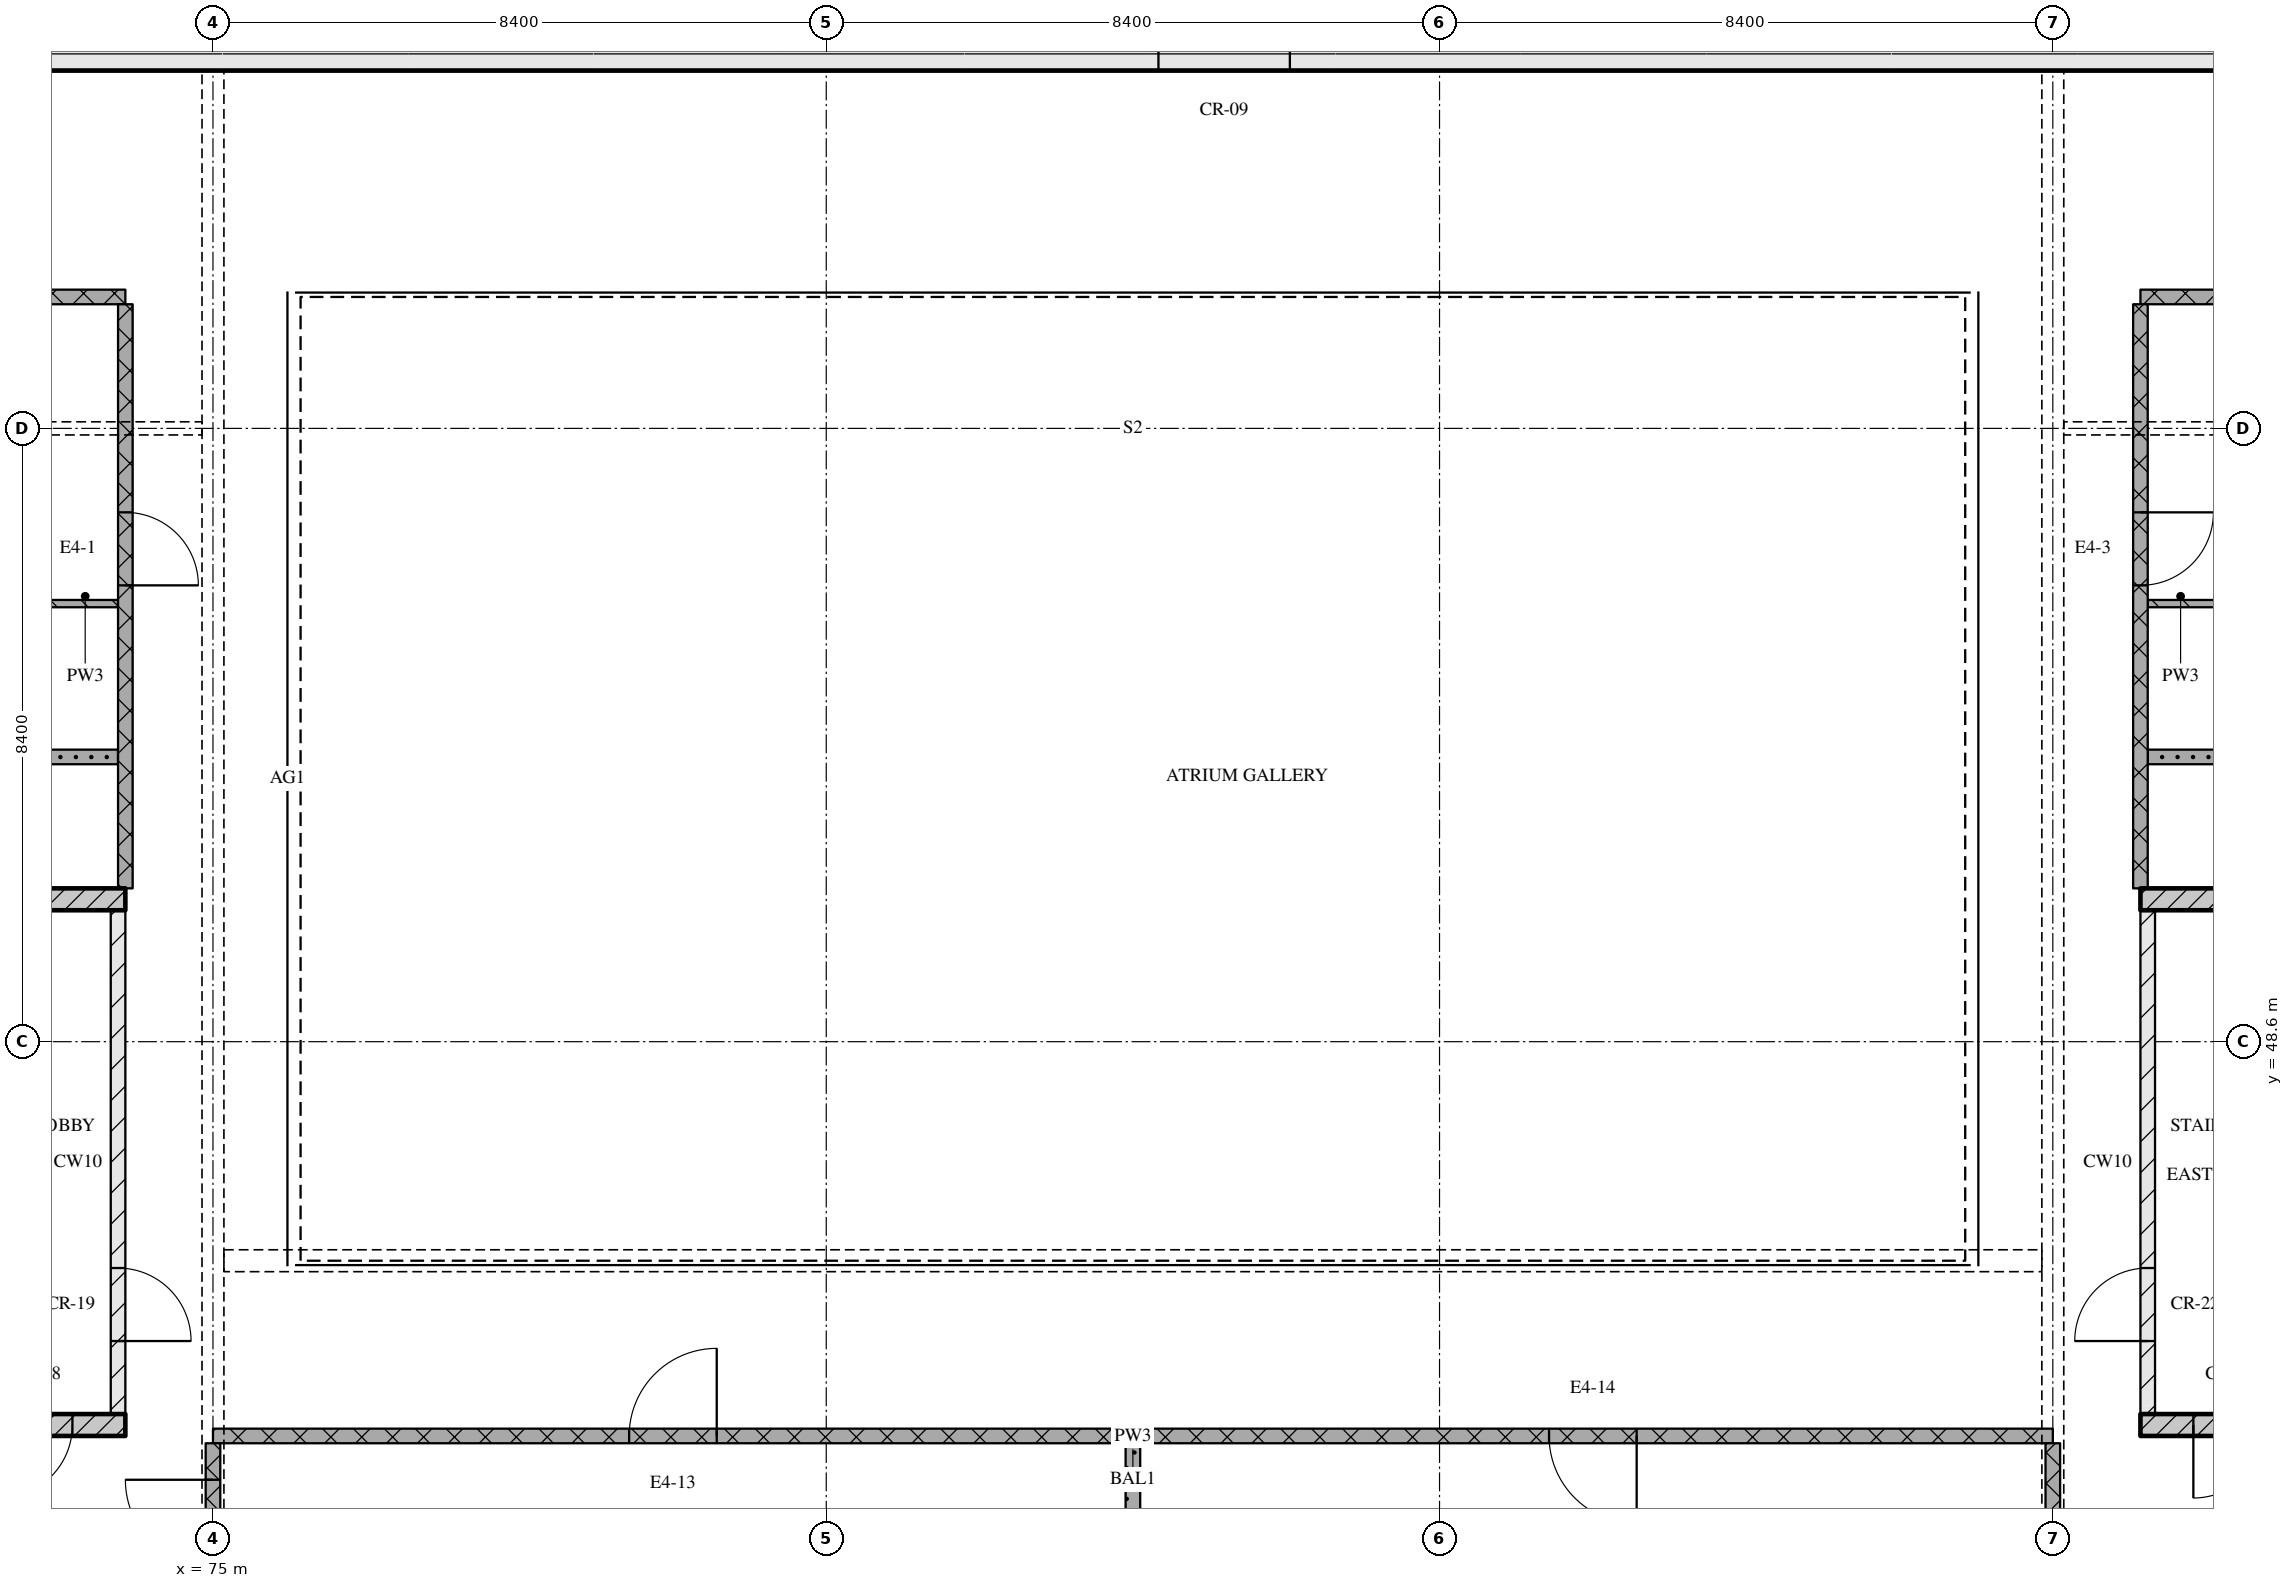
"""IFC4 building model, lengths in metres.
Left out: names, types, materials, properties, quantities, classifications, styles, units other than length and angle.
Written with IfcOpenShell. Run it as: python <this file> out.ifc"""

import sys

from ifc_helpers import new_model, si_unit, direction, frame, frame_2d, origin, place, context, subcontext, project, spatial, rectangle, extrude, element, fill, save


model = new_model("IFC4")
c1 = context("Model", 3, precision=1e-05, world=origin(), true_north=direction((0.0, 1.0)))
c2 = subcontext(c1, "Body", "Model", "MODEL_VIEW")
j1 = project(units=[si_unit("LENGTHUNIT", "METRE"), si_unit("PLANEANGLEUNIT", "RADIAN")], contexts=[c1])
p1 = place(None, origin())
s1 = spatial("IfcSite", under=j1, at=p1, CompositionType="ELEMENT")
p2 = place(p1, origin())
s2 = spatial("IfcBuilding", under=s1, at=p2, CompositionType="ELEMENT")
p3 = place(p2, frame((0.0, 0.0, 285.15)))
s3 = spatial("IfcBuildingStorey", under=s2, at=p3, CompositionType="ELEMENT", Elevation=285.15)
p4 = place(p3, frame((67.3, 62.15, 0.0), z_axis=(0.0, 0.0, 1.0), x_axis=(1.0, 0.0, 0.0)))
e1 = element("IfcWall", 1, at=p4, inside=s3, PredefinedType="SOLIDWALL", context=c2, shape_type="SweptSolid", body=[
    extrude(rectangle(XDim=40.6, YDim=0.5, at=frame_2d((20.3, 0.0))), origin(), (0.0, 0.0, 1.0), 3.32),
])
p5 = place(p4, frame((20.65, 0.0, 0.0)))
e2 = element("IfcOpeningElement", 2, at=p5, cuts=e1, PredefinedType="OPENING", context=c2, shape_type="SweptSolid", body=[
    extrude(rectangle(XDim=1.8, YDim=2.1, at=frame_2d((0.9, 1.05))), frame((0.0, 0.26, 0.0), z_axis=(0.0, -1.0, 0.0), x_axis=(1.0, 0.0, 0.0)), (0.0, 0.0, 1.0), 0.52),
])
p6 = place(p3, frame((68.2, 43.35, 0.0), z_axis=(0.0, 0.0, 1.0), x_axis=(1.0, 0.0, 0.0)))
e3 = element("IfcWall", 3, at=p6, inside=s3, PredefinedType="SOLIDWALL", context=c2, shape_type="SweptSolid", body=[
    extrude(rectangle(XDim=5.6, YDim=0.3, at=frame_2d((2.8, 0.0))), origin(), (0.0, 0.0, 1.0), 3.32),
])
p7 = place(p6, frame((3.875, 0.0, 0.0)))
e4 = element("IfcOpeningElement", 4, at=p7, cuts=e3, PredefinedType="OPENING", context=c2, shape_type="SweptSolid", body=[
    extrude(rectangle(XDim=1.0, YDim=2.1, at=frame_2d((0.5, 1.05))), frame((0.0, 0.16, 0.0), z_axis=(0.0, -1.0, 0.0), x_axis=(1.0, 0.0, 0.0)), (0.0, 0.0, 1.0), 0.32),
])
p8 = place(p3, frame((73.7, 43.5, 0.0), z_axis=(0.0, 0.0, 1.0), x_axis=(0.0, 1.0, 0.0)))
e5 = element("IfcWall", 5, at=p8, inside=s3, PredefinedType="PARTITIONING", context=c2, shape_type="SweptSolid", body=[
    extrude(rectangle(XDim=6.9, YDim=0.2, at=frame_2d((3.45, 0.0))), origin(), (0.0, 0.0, 1.0), 3.32),
])
p9 = place(p8, frame((1.0, 0.0, 0.0)))
e6 = element("IfcOpeningElement", 6, at=p9, cuts=e5, PredefinedType="OPENING", context=c2, shape_type="SweptSolid", body=[
    extrude(rectangle(XDim=1.0, YDim=2.1, at=frame_2d((0.5, 1.05))), frame((0.0, 0.11, 0.0), z_axis=(0.0, -1.0, 0.0), x_axis=(1.0, 0.0, 0.0)), (0.0, 0.0, 1.0), 0.22),
])
p10 = place(p3, frame((68.2, 50.55, 0.0), z_axis=(0.0, 0.0, 1.0), x_axis=(1.0, 0.0, 0.0)))
e7 = element("IfcWall", 7, at=p10, inside=s3, PredefinedType="SOLIDWALL", context=c2, shape_type="SweptSolid", body=[
    extrude(rectangle(XDim=5.6, YDim=0.3, at=frame_2d((2.8, 0.0))), origin(), (0.0, 0.0, 1.0), 3.32),
])
p11 = place(p3, frame((101.4, 43.35, 0.0), z_axis=(0.0, 0.0, 1.0), x_axis=(1.0, 0.0, 0.0)))
e8 = element("IfcWall", 8, at=p11, inside=s3, PredefinedType="SOLIDWALL", context=c2, shape_type="SweptSolid", body=[
    extrude(rectangle(XDim=5.6, YDim=0.3, at=frame_2d((2.8, 0.0))), origin(), (0.0, 0.0, 1.0), 3.32),
])
p12 = place(p11, frame((0.725, 0.0, 0.0)))
e9 = element("IfcOpeningElement", 9, at=p12, cuts=e8, PredefinedType="OPENING", context=c2, shape_type="SweptSolid", body=[
    extrude(rectangle(XDim=1.0, YDim=2.1, at=frame_2d((0.5, 1.05))), frame((0.0, 0.16, 0.0), z_axis=(0.0, -1.0, 0.0), x_axis=(1.0, 0.0, 0.0)), (0.0, 0.0, 1.0), 0.32),
])
p13 = place(p3, frame((101.5, 43.5, 0.0), z_axis=(0.0, 0.0, 1.0), x_axis=(0.0, 1.0, 0.0)))
e10 = element("IfcWall", 10, at=p13, inside=s3, PredefinedType="PARTITIONING", context=c2, shape_type="SweptSolid", body=[
    extrude(rectangle(XDim=6.9, YDim=0.2, at=frame_2d((3.45, 0.0))), origin(), (0.0, 0.0, 1.0), 3.32),
])
p14 = place(p13, frame((1.0, 0.0, 0.0)))
e11 = element("IfcOpeningElement", 11, at=p14, cuts=e10, PredefinedType="OPENING", context=c2, shape_type="SweptSolid", body=[
    extrude(rectangle(XDim=1.0, YDim=2.1, at=frame_2d((0.5, 1.05))), frame((0.0, 0.11, 0.0), z_axis=(0.0, -1.0, 0.0), x_axis=(1.0, 0.0, 0.0)), (0.0, 0.0, 1.0), 0.22),
])
p15 = place(p3, frame((101.4, 50.55, 0.0), z_axis=(0.0, 0.0, 1.0), x_axis=(1.0, 0.0, 0.0)))
e12 = element("IfcWall", 12, at=p15, inside=s3, PredefinedType="SOLIDWALL", context=c2, shape_type="SweptSolid", body=[
    extrude(rectangle(XDim=5.6, YDim=0.3, at=frame_2d((2.8, 0.0))), origin(), (0.0, 0.0, 1.0), 3.32),
])
p16 = place(p3, frame((100.2, 43.2, 0.0), z_axis=(0.0, 0.0, 1.0), x_axis=(-1.0, 0.0, 0.0)))
e13 = element("IfcWall", 13, at=p16, inside=s3, PredefinedType="PARTITIONING", context=c2, shape_type="SweptSolid", body=[
    extrude(rectangle(XDim=25.2, YDim=0.2, at=frame_2d((12.6, 0.0))), origin(), (0.0, 0.0, 1.0), 3.32),
])
p17 = place(p16, frame((5.7, 0.0, 0.0)))
e14 = element("IfcOpeningElement", 14, at=p17, cuts=e13, PredefinedType="OPENING", context=c2, shape_type="SweptSolid", body=[
    extrude(rectangle(XDim=1.2, YDim=2.1, at=frame_2d((0.6, 1.05))), frame((0.0, 0.11, 0.0), z_axis=(0.0, -1.0, 0.0), x_axis=(1.0, 0.0, 0.0)), (0.0, 0.0, 1.0), 0.22),
])
p18 = place(p16, frame((18.3, 0.0, 0.0)))
e15 = element("IfcOpeningElement", 15, at=p18, cuts=e13, PredefinedType="OPENING", context=c2, shape_type="SweptSolid", body=[
    extrude(rectangle(XDim=1.2, YDim=2.1, at=frame_2d((0.6, 1.05))), frame((0.0, 0.11, 0.0), z_axis=(0.0, -1.0, 0.0), x_axis=(1.0, 0.0, 0.0)), (0.0, 0.0, 1.0), 0.22),
])
for number, where, z_axis, x_axis in (
    (16, (56.68, 52.5, 0.0), (0.0, 0.0, 1.0), (1.0, 0.0, 0.0)),
    (17, (101.5, 52.5, 0.0), (0.0, 0.0, 1.0), (1.0, 0.0, 0.0)),
):
    element("IfcWall", number, at=place(p3, frame(where, z_axis=z_axis, x_axis=x_axis)), inside=s3, PredefinedType="PARTITIONING", context=c2, shape_type="SweptSolid", body=[
        extrude(rectangle(XDim=17.02, YDim=0.2, at=frame_2d((8.51, 0.0))), origin(), (0.0, 0.0, 1.0), 3.32),
    ])
p19 = place(p3, frame((73.7, 54.6, 0.0), z_axis=(0.0, 0.0, 1.0), x_axis=(-1.0, 0.0, 0.0)))
e18 = element("IfcWall", 18, at=p19, inside=s3, PredefinedType="PARTITIONING", context=c2, shape_type="SweptSolid", body=[
    extrude(rectangle(XDim=9.8, YDim=0.1, at=frame_2d((4.9, 0.0))), origin(), (0.0, 0.0, 1.0), 3.32),
])
p20 = place(p19, frame((4.45, 0.0, 0.0)))
e19 = element("IfcOpeningElement", 19, at=p20, cuts=e18, PredefinedType="OPENING", context=c2, shape_type="SweptSolid", body=[
    extrude(rectangle(XDim=0.8, YDim=2.1, at=frame_2d((0.4, 1.05))), frame((0.0, 0.06, 0.0), z_axis=(0.0, -1.0, 0.0), x_axis=(1.0, 0.0, 0.0)), (0.0, 0.0, 1.0), 0.12),
])
p21 = place(p3, frame((101.5, 54.6, 0.0), z_axis=(0.0, 0.0, 1.0), x_axis=(1.0, 0.0, 0.0)))
e20 = element("IfcWall", 20, at=p21, inside=s3, PredefinedType="PARTITIONING", context=c2, shape_type="SweptSolid", body=[
    extrude(rectangle(XDim=7.1, YDim=0.1, at=frame_2d((3.55, 0.0))), origin(), (0.0, 0.0, 1.0), 3.32),
])
for number, where, z_axis, x_axis in (
    (21, (64.2, 58.8, 0.0), (0.0, 0.0, 1.0), (1.0, 0.0, 0.0)),
    (22, (101.4, 58.8, 0.0), (0.0, 0.0, 1.0), (1.0, 0.0, 0.0)),
):
    element("IfcWall", number, at=place(p3, frame(where, z_axis=z_axis, x_axis=x_axis)), inside=s3, PredefinedType="PARTITIONING", context=c2, shape_type="SweptSolid", body=[
        extrude(rectangle(XDim=9.6, YDim=0.2, at=frame_2d((4.8, 0.0))), origin(), (0.0, 0.0, 1.0), 3.32),
    ])
p22 = place(p3, frame((73.8, 50.7, 0.0), z_axis=(0.0, 0.0, 1.0), x_axis=(0.0, 1.0, 0.0)))
e23 = element("IfcWall", 23, at=p22, inside=s3, PredefinedType="PARTITIONING", context=c2, shape_type="SweptSolid", body=[
    extrude(rectangle(XDim=8.0, YDim=0.2, at=frame_2d((4.0, 0.0))), origin(), (0.0, 0.0, 1.0), 3.32),
])
p23 = place(p22, frame((4.15, 0.0, 0.0)))
e24 = element("IfcOpeningElement", 24, at=p23, cuts=e23, PredefinedType="OPENING", context=c2, shape_type="SweptSolid", body=[
    extrude(rectangle(XDim=1.0, YDim=2.1, at=frame_2d((0.5, 1.05))), frame((0.0, 0.11, 0.0), z_axis=(0.0, -1.0, 0.0), x_axis=(1.0, 0.0, 0.0)), (0.0, 0.0, 1.0), 0.22),
])
p24 = place(p3, frame((75.0, 43.1, 0.0), z_axis=(0.0, 0.0, 1.0), x_axis=(0.0, -1.0, 0.0)))
e25 = element("IfcWall", 25, at=p24, inside=s3, PredefinedType="PARTITIONING", context=c2, shape_type="SweptSolid", body=[
    extrude(rectangle(XDim=2.2, YDim=0.2, at=frame_2d((1.1, 0.0))), origin(), (0.0, 0.0, 1.0), 2.53),
])
p25 = place(p24, frame((0.5, 0.0, 0.0)))
e26 = element("IfcOpeningElement", 26, at=p25, cuts=e25, PredefinedType="OPENING", context=c2, shape_type="SweptSolid", body=[
    extrude(rectangle(XDim=1.2, YDim=2.1, at=frame_2d((0.6, 1.05))), frame((0.0, 0.11, 0.0), z_axis=(0.0, -1.0, 0.0), x_axis=(1.0, 0.0, 0.0)), (0.0, 0.0, 1.0), 0.22),
])
p26 = place(p3, frame((87.6, 43.1, 0.0), z_axis=(0.0, 0.0, 1.0), x_axis=(0.0, -1.0, 0.0)))
e27 = element("IfcWall", 27, at=p26, inside=s3, PredefinedType="PARTITIONING", context=c2, shape_type="SweptSolid", body=[
    extrude(rectangle(XDim=4.42, YDim=0.2, at=frame_2d((2.21, 0.0))), origin(), (0.0, 0.0, 1.0), 3.32),
])
p27 = place(p3, frame((100.2, 43.1, 0.0), z_axis=(0.0, 0.0, 1.0), x_axis=(0.0, -1.0, 0.0)))
e28 = element("IfcWall", 28, at=p27, inside=s3, PredefinedType="PARTITIONING", context=c2, shape_type="SweptSolid", body=[
    extrude(rectangle(XDim=2.2, YDim=0.2, at=frame_2d((1.1, 0.0))), origin(), (0.0, 0.0, 1.0), 2.53),
])
p28 = place(p3, frame((101.4, 58.7, 0.0), z_axis=(0.0, 0.0, 1.0), x_axis=(0.0, -1.0, 0.0)))
e29 = element("IfcWall", 29, at=p28, inside=s3, PredefinedType="PARTITIONING", context=c2, shape_type="SweptSolid", body=[
    extrude(rectangle(XDim=8.0, YDim=0.2, at=frame_2d((4.0, 0.0))), origin(), (0.0, 0.0, 1.0), 3.32),
])
p29 = place(p28, frame((2.85, 0.0, 0.0)))
e30 = element("IfcOpeningElement", 30, at=p29, cuts=e29, PredefinedType="OPENING", context=c2, shape_type="SweptSolid", body=[
    extrude(rectangle(XDim=1.0, YDim=2.1, at=frame_2d((0.5, 1.05))), frame((0.0, 0.11, 0.0), z_axis=(0.0, -1.0, 0.0), x_axis=(1.0, 0.0, 0.0)), (0.0, 0.0, 1.0), 0.22),
])
p30 = place(p5, origin())
e31 = element("IfcDoor", 31, at=p30, inside=s3, OperationType="DOUBLE_DOOR_SINGLE_SWING", PredefinedType="DOOR", context=c2, shape_type="SweptSolid", body=[
    extrude(rectangle(XDim=1.8, YDim=2.1, at=frame_2d((0.9, 1.05))), frame((0.0, 0.025, 0.0), z_axis=(0.0, -1.0, 0.0), x_axis=(1.0, 0.0, 0.0)), (0.0, 0.0, 1.0), 0.05),
])
fill(e2, e31)
p31 = place(p7, origin())
e32 = element("IfcDoor", 32, at=p31, inside=s3, OperationType="SINGLE_SWING_RIGHT", PredefinedType="DOOR", context=c2, shape_type="SweptSolid", body=[
    extrude(rectangle(XDim=1.0, YDim=2.1, at=frame_2d((0.5, 1.05))), frame((0.0, 0.025, 0.0), z_axis=(0.0, -1.0, 0.0), x_axis=(1.0, 0.0, 0.0)), (0.0, 0.0, 1.0), 0.05),
])
fill(e4, e32)
p32 = place(p9, origin())
e33 = element("IfcDoor", 33, at=p32, inside=s3, OperationType="SINGLE_SWING_RIGHT", PredefinedType="DOOR", context=c2, shape_type="SweptSolid", body=[
    extrude(rectangle(XDim=1.0, YDim=2.1, at=frame_2d((0.5, 1.05))), frame((0.0, 0.025, 0.0), z_axis=(0.0, -1.0, 0.0), x_axis=(1.0, 0.0, 0.0)), (0.0, 0.0, 1.0), 0.05),
])
fill(e6, e33)
p33 = place(p12, origin())
e34 = element("IfcDoor", 34, at=p33, inside=s3, OperationType="SINGLE_SWING_RIGHT", PredefinedType="DOOR", context=c2, shape_type="SweptSolid", body=[
    extrude(rectangle(XDim=1.0, YDim=2.1, at=frame_2d((0.5, 1.05))), frame((0.0, 0.025, 0.0), z_axis=(0.0, -1.0, 0.0), x_axis=(1.0, 0.0, 0.0)), (0.0, 0.0, 1.0), 0.05),
])
fill(e9, e34)
p34 = place(p14, origin())
e35 = element("IfcDoor", 35, at=p34, inside=s3, OperationType="SINGLE_SWING_LEFT", PredefinedType="DOOR", context=c2, shape_type="SweptSolid", body=[
    extrude(rectangle(XDim=1.0, YDim=2.1, at=frame_2d((0.5, 1.05))), frame((0.0, 0.025, 0.0), z_axis=(0.0, -1.0, 0.0), x_axis=(1.0, 0.0, 0.0)), (0.0, 0.0, 1.0), 0.05),
])
fill(e11, e35)
p35 = place(p17, origin())
e36 = element("IfcDoor", 36, at=p35, inside=s3, OperationType="SINGLE_SWING_LEFT", PredefinedType="DOOR", context=c2, shape_type="SweptSolid", body=[
    extrude(rectangle(XDim=1.2, YDim=2.1, at=frame_2d((0.6, 1.05))), frame((0.0, 0.025, 0.0), z_axis=(0.0, -1.0, 0.0), x_axis=(1.0, 0.0, 0.0)), (0.0, 0.0, 1.0), 0.05),
])
fill(e14, e36)
p36 = place(p18, origin())
e37 = element("IfcDoor", 37, at=p36, inside=s3, OperationType="SINGLE_SWING_RIGHT", PredefinedType="DOOR", context=c2, shape_type="SweptSolid", body=[
    extrude(rectangle(XDim=1.2, YDim=2.1, at=frame_2d((0.6, 1.05))), frame((0.0, 0.025, 0.0), z_axis=(0.0, -1.0, 0.0), x_axis=(1.0, 0.0, 0.0)), (0.0, 0.0, 1.0), 0.05),
])
fill(e15, e37)
p37 = place(p23, origin())
e38 = element("IfcDoor", 38, at=p37, inside=s3, OperationType="SINGLE_SWING_RIGHT", PredefinedType="DOOR", context=c2, shape_type="SweptSolid", body=[
    extrude(rectangle(XDim=1.0, YDim=2.1, at=frame_2d((0.5, 1.05))), frame((0.0, 0.025, 0.0), z_axis=(0.0, -1.0, 0.0), x_axis=(1.0, 0.0, 0.0)), (0.0, 0.0, 1.0), 0.05),
])
fill(e24, e38)
p38 = place(p25, origin())
e39 = element("IfcDoor", 39, at=p38, inside=s3, OperationType="SINGLE_SWING_RIGHT", PredefinedType="DOOR", context=c2, shape_type="SweptSolid", body=[
    extrude(rectangle(XDim=1.2, YDim=2.1, at=frame_2d((0.6, 1.05))), frame((0.0, 0.025, 0.0), z_axis=(0.0, -1.0, 0.0), x_axis=(1.0, 0.0, 0.0)), (0.0, 0.0, 1.0), 0.05),
])
fill(e26, e39)
p39 = place(p29, origin())
e40 = element("IfcDoor", 40, at=p39, inside=s3, OperationType="SINGLE_SWING_LEFT", PredefinedType="DOOR", context=c2, shape_type="SweptSolid", body=[
    extrude(rectangle(XDim=1.0, YDim=2.1, at=frame_2d((0.5, 1.05))), frame((0.0, 0.025, 0.0), z_axis=(0.0, -1.0, 0.0), x_axis=(1.0, 0.0, 0.0)), (0.0, 0.0, 1.0), 0.05),
])
fill(e30, e40)
save(model, sys.argv[1])
